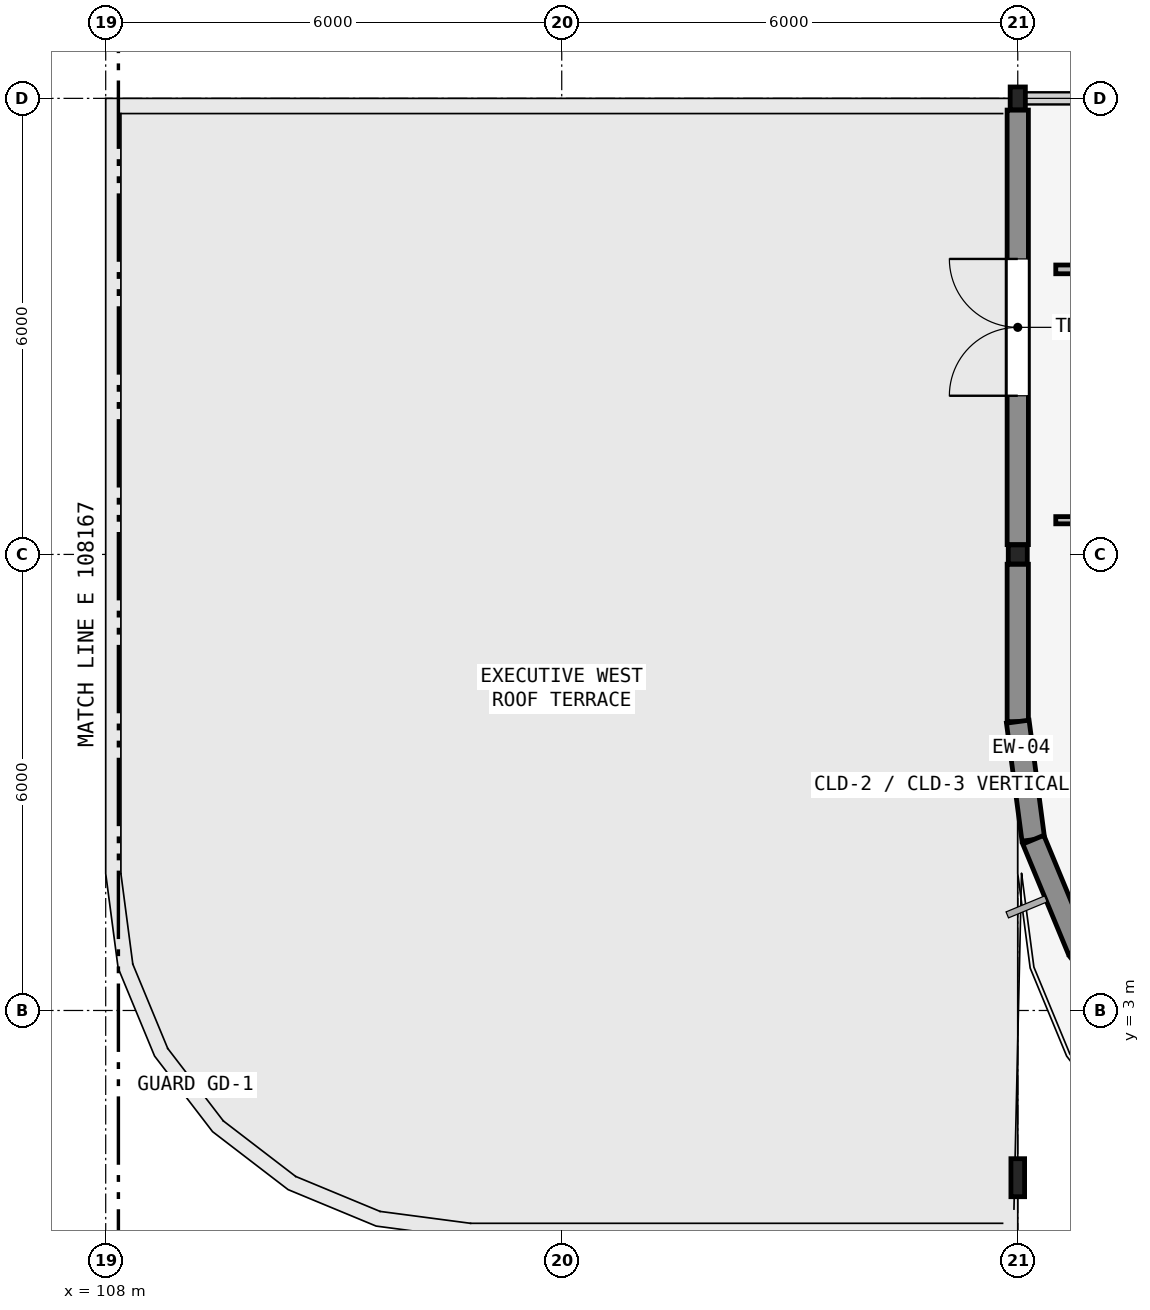
"""IFC4 building model, lengths in metres.
Left out: names, types, materials, properties, quantities, classifications, styles, units other than length and angle.
Written with IfcOpenShell. Run it as: python <this file> out.ifc"""

import sys

from ifc_helpers import new_model, si_unit, direction, frame, frame_2d, origin, origin_2d, place, context, subcontext, project, spatial, rectangle, hollow_rectangle, i_section, extrude, element, fill, save


model = new_model("IFC4")
c1 = context("Model", 3, precision=1e-05, world=origin(), true_north=direction((0.0, 1.0)))
c2 = subcontext(c1, "Body", "Model", "MODEL_VIEW")
j1 = project(units=[si_unit("LENGTHUNIT", "METRE"), si_unit("PLANEANGLEUNIT", "RADIAN")], contexts=[c1])
p1 = place(None, origin())
s1 = spatial("IfcSite", under=j1, at=p1, CompositionType="ELEMENT")
p2 = place(p1, origin())
s2 = spatial("IfcBuilding", under=s1, at=p2, CompositionType="ELEMENT")
p3 = place(p2, frame((0.0, 0.0, 30.0)))
s3 = spatial("IfcBuildingStorey", under=s2, at=p3, CompositionType="ELEMENT", Elevation=30.0)
p4 = place(p3, frame((120.0, 0.8, 0.0), z_axis=(0.0, 0.0, 1.0), x_axis=(1.0, 0.0, 0.0)))
e1 = element("IfcColumn", 1, at=p4, inside=s3, PredefinedType="COLUMN", context=c2, shape_type="SweptSolid", body=[
    extrude(i_section(OverallWidth=0.18, OverallDepth=0.5, WebThickness=0.01, FlangeThickness=0.017, FilletRadius=0.017, at=origin_2d()), origin(), (0.0, 0.0, 1.0), 4.2),
])
p5 = place(p3, frame((120.0, 9.0, 0.0), z_axis=(0.0, 0.0, 1.0), x_axis=(1.0, 0.0, 0.0)))
e2 = element("IfcColumn", 2, at=p5, inside=s3, PredefinedType="COLUMN", context=c2, shape_type="SweptSolid", body=[
    extrude(hollow_rectangle(XDim=0.25, YDim=0.25, WallThickness=0.012, InnerFilletRadius=0.012, OuterFilletRadius=0.024, at=origin_2d()), origin(), (0.0, 0.0, 1.0), 4.2),
])
p6 = place(p3, frame((120.0, 15.0, 0.0), z_axis=(0.0, 0.0, 1.0), x_axis=(1.0, 0.0, 0.0)))
e3 = element("IfcColumn", 3, at=p6, inside=s3, PredefinedType="COLUMN", context=c2, shape_type="SweptSolid", body=[
    extrude(hollow_rectangle(XDim=0.2, YDim=0.3, WallThickness=0.012, InnerFilletRadius=0.012, OuterFilletRadius=0.024, at=origin_2d()), origin(), (0.0, 0.0, 1.0), 4.2),
])
p7 = place(p3, frame((120.0, 6.8, 0.0), z_axis=(0.0, 0.0, 1.0), x_axis=(0.0, 1.0, 0.0)))
e4 = element("IfcWall", 4, at=p7, inside=s3, PredefinedType="SOLIDWALL", context=c2, shape_type="SweptSolid", body=[
    extrude(rectangle(XDim=2.071, YDim=0.28, at=frame_2d((1.036, 0.0))), origin(), (0.0, 0.0, 1.0), 3.58),
])
p8 = place(p3, frame((120.0, 9.129, 0.0), z_axis=(0.0, 0.0, 1.0), x_axis=(0.0, 1.0, 0.0)))
e5 = element("IfcWall", 5, at=p8, inside=s3, PredefinedType="SOLIDWALL", context=c2, shape_type="SweptSolid", body=[
    extrude(rectangle(XDim=5.717, YDim=0.28, at=frame_2d((2.858, 0.0))), origin(), (0.0, 0.0, 1.0), 3.58),
])
p9 = place(p8, frame((1.958, 0.0, 0.0)))
e6 = element("IfcOpeningElement", 6, at=p9, cuts=e5, PredefinedType="OPENING", context=c2, shape_type="SweptSolid", body=[
    extrude(rectangle(XDim=1.8, YDim=2.3, at=frame_2d((0.9, 1.15))), frame((0.0, 0.15, 0.0), z_axis=(0.0, -1.0, 0.0), x_axis=(1.0, 0.0, 0.0)), (0.0, 0.0, 1.0), 0.3),
])
p10 = place(p3, frame((120.0, 6.8, 0.0), z_axis=(0.0, 0.0, 1.0), x_axis=(0.130458544462, -0.991453765022, 0.0)))
e7 = element("IfcWall", 7, at=p10, inside=s3, PredefinedType="SOLIDWALL", context=c2, shape_type="SweptSolid", body=[
    extrude(rectangle(XDim=1.566, YDim=0.3, at=frame_2d((0.783, 0.0))), origin(), (0.0, 0.0, 1.0), 3.624),
])
p11 = place(p3, frame((120.204, 5.247, 0.0), z_axis=(0.0, 0.0, 1.0), x_axis=(0.382677606907, -0.923881945474, 0.0)))
e8 = element("IfcWall", 8, at=p11, inside=s3, PredefinedType="SOLIDWALL", context=c2, shape_type="SweptSolid", body=[
    extrude(rectangle(XDim=1.566, YDim=0.3, at=frame_2d((0.783, 0.0))), origin(), (0.0, 0.0, 1.0), 3.624),
])
p12 = place(p3, frame((120.804, 3.8, 0.0), z_axis=(0.0, 0.0, 1.0), x_axis=(0.608791411033, -0.793330333374, 0.0)))
e9 = element("IfcWall", 9, at=p12, inside=s3, PredefinedType="SOLIDWALL", context=c2, shape_type="SweptSolid", body=[
    extrude(rectangle(XDim=1.566, YDim=0.3, at=frame_2d((0.783, 0.0))), origin(), (0.0, 0.0, 1.0), 4.035),
])
p13 = place(p3, frame((126.0, 12.75, 0.0), z_axis=(0.0, 0.0, 1.0), x_axis=(-1.0, 0.0, 0.0)))
e10 = element("IfcWall", 10, at=p13, inside=s3, PredefinedType="PARTITIONING", context=c2, shape_type="SweptSolid", body=[
    extrude(rectangle(XDim=5.5, YDim=0.115, at=frame_2d((2.75, 0.0))), origin(), (0.0, 0.0, 1.0), 3.706),
])
p14 = place(p13, frame((1.975, 0.0, 0.0)))
e11 = element("IfcOpeningElement", 11, at=p14, cuts=e10, PredefinedType="OPENING", context=c2, shape_type="SweptSolid", body=[
    extrude(rectangle(XDim=1.55, YDim=2.2, at=frame_2d((0.775, 1.1))), frame((0.0, 0.067, 0.0), z_axis=(0.0, -1.0, 0.0), x_axis=(1.0, 0.0, 0.0)), (0.0, 0.0, 1.0), 0.135),
])
p15 = place(p3, frame((120.5, 9.45, 0.0), z_axis=(0.0, 0.0, 1.0), x_axis=(1.0, 0.0, 0.0)))
e12 = element("IfcWall", 12, at=p15, inside=s3, PredefinedType="PARTITIONING", context=c2, shape_type="SweptSolid", body=[
    extrude(rectangle(XDim=5.1, YDim=0.095, at=frame_2d((2.55, 0.0))), origin(), (0.0, 0.0, 1.0), 3.73),
])
p16 = place(p15, frame((2.05, 0.0, 0.0)))
e13 = element("IfcOpeningElement", 13, at=p16, cuts=e12, PredefinedType="OPENING", context=c2, shape_type="SweptSolid", body=[
    extrude(rectangle(XDim=1.0, YDim=2.15, at=frame_2d((0.5, 1.075))), frame((0.0, 0.057, 0.0), z_axis=(0.0, -1.0, 0.0), x_axis=(1.0, 0.0, 0.0)), (0.0, 0.0, 1.0), 0.115),
])
p17 = place(p9, origin())
e14 = element("IfcDoor", 14, at=p17, inside=s3, OperationType="DOUBLE_DOOR_SINGLE_SWING", PredefinedType="DOOR", context=c2, shape_type="SweptSolid", body=[
    extrude(rectangle(XDim=1.8, YDim=2.3, at=frame_2d((0.9, 1.15))), frame((0.0, 0.025, 0.0), z_axis=(0.0, -1.0, 0.0), x_axis=(1.0, 0.0, 0.0)), (0.0, 0.0, 1.0), 0.05),
])
fill(e6, e14)
save(model, sys.argv[1])
